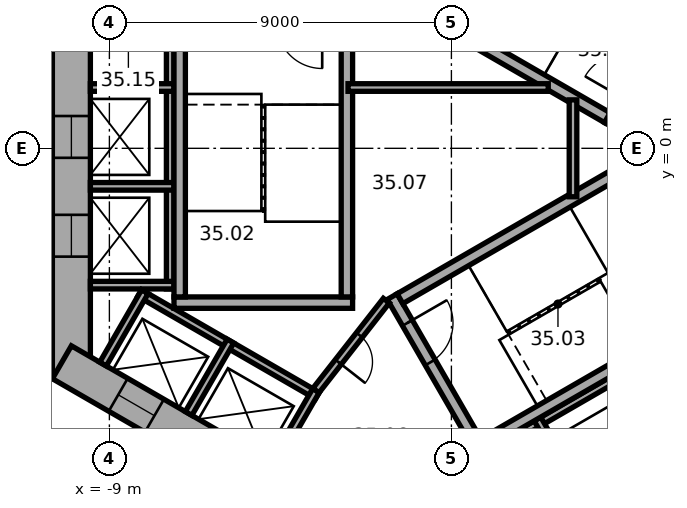
"""IFC4 building model, lengths in metres.
Left out: names, types, materials, properties, quantities, classifications, styles, units other than length and angle.
Written with IfcOpenShell. Run it as: python <this file> out.ifc"""

import sys

from ifc_helpers import new_model, si_unit, direction, frame, frame_2d, origin, place, context, subcontext, project, spatial, rectangle, extrude, element, fill, save


model = new_model("IFC4")
c1 = context("Model", 3, precision=1e-05, world=origin(), true_north=direction((0.0, 1.0)))
c2 = subcontext(c1, "Body", "Model", "MODEL_VIEW")
j1 = project(units=[si_unit("LENGTHUNIT", "METRE"), si_unit("PLANEANGLEUNIT", "RADIAN")], contexts=[c1])
p1 = place(None, origin())
s1 = spatial("IfcSite", under=j1, at=p1, CompositionType="ELEMENT")
p2 = place(p1, origin())
s2 = spatial("IfcBuilding", under=s1, at=p2, CompositionType="ELEMENT")
p3 = place(p2, frame((0.0, 0.0, 146.6)))
s3 = spatial("IfcBuildingStorey", under=s2, at=p3, CompositionType="ELEMENT", Elevation=146.6)
p4 = place(p3, frame((-10.0, 6.062, 0.0), z_axis=(0.0, 0.0, 1.0), x_axis=(0.0, -1.0, 0.0)))
e1 = element("IfcWall", 1, at=p4, inside=s3, PredefinedType="SHEAR", context=c2, shape_type="SweptSolid", body=[
    extrude(rectangle(XDim=12.125, YDim=1.0, at=frame_2d((6.062, 0.0))), origin(), (0.0, 0.0, 1.0), 3.7),
])
p5 = place(p4, frame((5.212, 0.0, 0.0)))
e2 = element("IfcOpeningElement", 2, at=p5, cuts=e1, PredefinedType="OPENING", context=c2, shape_type="SweptSolid", body=[
    extrude(rectangle(XDim=1.1, YDim=2.1, at=frame_2d((0.55, 1.05))), frame((0.0, 0.51, 0.0), z_axis=(0.0, -1.0, 0.0), x_axis=(1.0, 0.0, 0.0)), (0.0, 0.0, 1.0), 1.02),
])
p6 = place(p4, frame((7.812, 0.0, 0.0)))
e3 = element("IfcOpeningElement", 3, at=p6, cuts=e1, PredefinedType="OPENING", context=c2, shape_type="SweptSolid", body=[
    extrude(rectangle(XDim=1.1, YDim=2.1, at=frame_2d((0.55, 1.05))), frame((0.0, 0.51, 0.0), z_axis=(0.0, -1.0, 0.0), x_axis=(1.0, 0.0, 0.0)), (0.0, 0.0, 1.0), 1.02),
])
p7 = place(p3, frame((-10.25, -5.629, 0.0), z_axis=(0.0, 0.0, 1.0), x_axis=(0.866022616891, -0.50000482701, 0.0)))
e4 = element("IfcWall", 4, at=p7, inside=s3, PredefinedType="SHEAR", context=c2, shape_type="SweptSolid", body=[
    extrude(rectangle(XDim=12.125, YDim=1.0, at=frame_2d((6.062, 0.0))), origin(), (0.0, 0.0, 1.0), 3.7),
])
p8 = place(p7, frame((6.262, 0.0, 0.0)))
e5 = element("IfcOpeningElement", 5, at=p8, cuts=e4, PredefinedType="OPENING", context=c2, shape_type="SweptSolid", body=[
    extrude(rectangle(XDim=1.5, YDim=2.1, at=frame_2d((0.75, 1.05))), frame((0.0, 0.51, 0.0), z_axis=(0.0, -1.0, 0.0), x_axis=(1.0, 0.0, 0.0)), (0.0, 0.0, 1.0), 1.02),
])
p9 = place(p7, frame((1.712, 0.0, 0.0)))
e6 = element("IfcOpeningElement", 6, at=p9, cuts=e4, PredefinedType="OPENING", context=c2, shape_type="SweptSolid", body=[
    extrude(rectangle(XDim=1.1, YDim=2.1, at=frame_2d((0.55, 1.05))), frame((0.0, 0.51, 0.0), z_axis=(0.0, -1.0, 0.0), x_axis=(1.0, 0.0, 0.0)), (0.0, 0.0, 1.0), 1.02),
])
p10 = place(p7, frame((4.312, 0.0, 0.0)))
e7 = element("IfcOpeningElement", 7, at=p10, cuts=e4, PredefinedType="OPENING", context=c2, shape_type="SweptSolid", body=[
    extrude(rectangle(XDim=1.1, YDim=2.1, at=frame_2d((0.55, 1.05))), frame((0.0, 0.51, 0.0), z_axis=(0.0, -1.0, 0.0), x_axis=(1.0, 0.0, 0.0)), (0.0, 0.0, 1.0), 1.02),
])
p11 = place(p3, frame((-0.25, -11.691, 0.0), z_axis=(0.0, 0.0, 1.0), x_axis=(0.866022616891, 0.50000482701, 0.0)))
e8 = element("IfcWall", 8, at=p11, inside=s3, PredefinedType="SHEAR", context=c2, shape_type="SweptSolid", body=[
    extrude(rectangle(XDim=12.125, YDim=1.0, at=frame_2d((6.062, 0.0))), origin(), (0.0, 0.0, 1.0), 3.7),
])
p12 = place(p11, frame((2.612, 0.0, 0.0)))
e9 = element("IfcOpeningElement", 9, at=p12, cuts=e8, PredefinedType="OPENING", context=c2, shape_type="SweptSolid", body=[
    extrude(rectangle(XDim=1.1, YDim=2.1, at=frame_2d((0.55, 1.05))), frame((0.0, 0.51, 0.0), z_axis=(0.0, -1.0, 0.0), x_axis=(1.0, 0.0, 0.0)), (0.0, 0.0, 1.0), 1.02),
])
p13 = place(p11, frame((5.212, 0.0, 0.0)))
e10 = element("IfcOpeningElement", 10, at=p13, cuts=e8, PredefinedType="OPENING", context=c2, shape_type="SweptSolid", body=[
    extrude(rectangle(XDim=1.1, YDim=2.1, at=frame_2d((0.55, 1.05))), frame((0.0, 0.51, 0.0), z_axis=(0.0, -1.0, 0.0), x_axis=(1.0, 0.0, 0.0)), (0.0, 0.0, 1.0), 1.02),
])
p14 = place(p11, frame((7.812, 0.0, 0.0)))
e11 = element("IfcOpeningElement", 11, at=p14, cuts=e8, PredefinedType="OPENING", context=c2, shape_type="SweptSolid", body=[
    extrude(rectangle(XDim=1.1, YDim=2.1, at=frame_2d((0.55, 1.05))), frame((0.0, 0.51, 0.0), z_axis=(0.0, -1.0, 0.0), x_axis=(1.0, 0.0, 0.0)), (0.0, 0.0, 1.0), 1.02),
])
p15 = place(p3, frame((-7.4, 4.3, 0.0), z_axis=(0.0, 0.0, 1.0), x_axis=(0.0, -1.0, 0.0)))
e12 = element("IfcWall", 12, at=p15, inside=s3, PredefinedType="PARTITIONING", context=c2, shape_type="SweptSolid", body=[
    extrude(rectangle(XDim=8.0, YDim=0.2, at=frame_2d((4.0, 0.0))), origin(), (0.0, 0.0, 1.0), 3.42),
])
for number, where, z_axis, x_axis in (
    (13, (-7.3, 1.6, 0.0), (0.0, 0.0, 1.0), (-1.0, 0.0, 0.0)),
    (14, (-7.3, -1.0, 0.0), (0.0, 0.0, 1.0), (-1.0, 0.0, 0.0)),
    (15, (-7.3, -3.6, 0.0), (0.0, 0.0, 1.0), (-1.0, 0.0, 0.0)),
):
    element("IfcWall", number, at=place(p3, frame(where, z_axis=z_axis, x_axis=x_axis)), inside=s3, PredefinedType="PARTITIONING", context=c2, shape_type="SweptSolid", body=[
        extrude(rectangle(XDim=2.2, YDim=0.2, at=frame_2d((1.1, 0.0))), origin(), (0.0, 0.0, 1.0), 3.42),
    ])
p16 = place(p3, frame((-8.203, -3.809, 0.0), z_axis=(0.0, 0.0, 1.0), x_axis=(0.866028230842, -0.499995103361, 0.0)))
e16 = element("IfcWall", 16, at=p16, inside=s3, PredefinedType="PARTITIONING", context=c2, shape_type="SweptSolid", body=[
    extrude(rectangle(XDim=5.4, YDim=0.2, at=frame_2d((2.7, 0.0))), origin(), (0.0, 0.0, 1.0), 3.42),
])
for number, where, z_axis, x_axis in (
    (17, (-8.067, -3.772, 0.0), (0.0, 0.0, 1.0), (-0.5, -0.866, 0.0)),
    (18, (-5.815, -5.072, 0.0), (0.0, 0.0, 1.0), (-0.5, -0.866, 0.0)),
):
    element("IfcWall", number, at=place(p3, frame(where, z_axis=z_axis, x_axis=x_axis)), inside=s3, PredefinedType="PARTITIONING", context=c2, shape_type="SweptSolid", body=[
        extrude(rectangle(XDim=2.2, YDim=0.2, at=frame_2d((1.1, 0.0))), origin(), (0.0, 0.0, 1.0), 3.42),
    ])
p17 = place(p3, frame((-3.563, -6.372, 0.0), z_axis=(0.0, 0.0, 1.0), x_axis=(-0.499994660107, -0.866028486751, 0.0)))
e19 = element("IfcWall", 19, at=p17, inside=s3, PredefinedType="PARTITIONING", context=c2, shape_type="SweptSolid", body=[
    extrude(rectangle(XDim=2.2, YDim=0.2, at=frame_2d((1.1, 0.0))), origin(), (0.0, 0.0, 1.0), 3.42),
])
p18 = place(p3, frame((-0.024, -8.559, 0.0), z_axis=(0.0, 0.0, 1.0), x_axis=(0.866026010844, 0.49999894854, 0.0)))
e20 = element("IfcWall", 20, at=p18, inside=s3, PredefinedType="PARTITIONING", context=c2, shape_type="SweptSolid", body=[
    extrude(rectangle(XDim=8.0, YDim=0.2, at=frame_2d((4.0, 0.0))), origin(), (0.0, 0.0, 1.0), 3.42),
])
p19 = place(p3, frame((2.264, -7.122, 0.0), z_axis=(0.0, 0.0, 1.0), x_axis=(0.500077893725, -0.86598042715, 0.0)))
e21 = element("IfcWall", 21, at=p19, inside=s3, PredefinedType="PARTITIONING", context=c2, shape_type="SweptSolid", body=[
    extrude(rectangle(XDim=2.2, YDim=0.2, at=frame_2d((1.1, 0.0))), origin(), (0.0, 0.0, 1.0), 3.42),
])
p20 = place(p3, frame((4.158, 0.602, 0.0), z_axis=(0.0, 0.0, 1.0), x_axis=(0.499977259774, 0.866038532462, 0.0)))
e22 = element("IfcWall", 22, at=p20, inside=s3, PredefinedType="SHEAR", context=c2, shape_type="SweptSolid", body=[
    extrude(rectangle(XDim=4.7, YDim=0.3, at=frame_2d((2.35, 0.0))), origin(), (0.0, 0.0, 1.0), 3.42),
])
p21 = place(p20, frame((0.8, 0.0, 0.0)))
e23 = element("IfcOpeningElement", 23, at=p21, cuts=e22, PredefinedType="OPENING", context=c2, shape_type="SweptSolid", body=[
    extrude(rectangle(XDim=1.2, YDim=2.1, at=frame_2d((0.6, 1.05))), frame((0.0, 0.16, 0.0), z_axis=(0.0, -1.0, 0.0), x_axis=(1.0, 0.0, 0.0)), (0.0, 0.0, 1.0), 0.32),
])
p22 = place(p3, frame((4.103, 0.807, 0.0), z_axis=(0.0, 0.0, 1.0), x_axis=(-0.866027801685, 0.499995846692, 0.0)))
e24 = element("IfcWall", 24, at=p22, inside=s3, PredefinedType="SHEAR", context=c2, shape_type="SweptSolid", body=[
    extrude(rectangle(XDim=7.06, YDim=0.3, at=frame_2d((3.53, 0.0))), origin(), (0.0, 0.0, 1.0), 3.42),
])
p23 = place(p3, frame((-2.6, -4.06, 0.0), z_axis=(0.0, 0.0, 1.0), x_axis=(-1.0, 0.0, 0.0)))
e25 = element("IfcWall", 25, at=p23, inside=s3, PredefinedType="SHEAR", context=c2, shape_type="SweptSolid", body=[
    extrude(rectangle(XDim=4.7, YDim=0.3, at=frame_2d((2.35, 0.0))), origin(), (0.0, 0.0, 1.0), 3.42),
])
for number, where, z_axis, x_axis in (
    (26, (-2.75, 3.15, 0.0), (0.0, 0.0, 1.0), (0.0, -1.0, 0.0)),
    (27, (-7.15, 3.15, 0.0), (0.0, 0.0, 1.0), (0.0, -1.0, 0.0)),
):
    element("IfcWall", number, at=place(p3, frame(where, z_axis=z_axis, x_axis=x_axis)), inside=s3, PredefinedType="SHEAR", context=c2, shape_type="SweptSolid", body=[
        extrude(rectangle(XDim=7.06, YDim=0.3, at=frame_2d((3.53, 0.0))), origin(), (0.0, 0.0, 1.0), 3.42),
    ])
p24 = place(p3, frame((-1.558, -3.902, 0.0), z_axis=(0.0, 0.0, 1.0), x_axis=(0.499977259774, -0.866038532462, 0.0)))
e28 = element("IfcWall", 28, at=p24, inside=s3, PredefinedType="SHEAR", context=c2, shape_type="SweptSolid", body=[
    extrude(rectangle(XDim=4.7, YDim=0.3, at=frame_2d((2.35, 0.0))), origin(), (0.0, 0.0, 1.0), 3.42),
])
p25 = place(p24, frame((0.8, 0.0, 0.0)))
e29 = element("IfcOpeningElement", 29, at=p25, cuts=e28, PredefinedType="OPENING", context=c2, shape_type="SweptSolid", body=[
    extrude(rectangle(XDim=1.2, YDim=2.1, at=frame_2d((0.6, 1.05))), frame((0.0, 0.16, 0.0), z_axis=(0.0, -1.0, 0.0), x_axis=(1.0, 0.0, 0.0)), (0.0, 0.0, 1.0), 0.32),
])
for number, where, z_axis, x_axis in (
    (30, (-1.353, -3.957, 0.0), (0.0, 0.0, 1.0), (0.866, 0.5, 0.0)),
    (31, (0.847, -7.767, 0.0), (0.0, 0.0, 1.0), (0.866, 0.5, 0.0)),
):
    element("IfcWall", number, at=place(p3, frame(where, z_axis=z_axis, x_axis=x_axis)), inside=s3, PredefinedType="SHEAR", context=c2, shape_type="SweptSolid", body=[
        extrude(rectangle(XDim=7.06, YDim=0.3, at=frame_2d((3.53, 0.0))), origin(), (0.0, 0.0, 1.0), 3.42),
    ])
p26 = place(p3, frame((-1.712, -4.008, 0.0), z_axis=(0.0, 0.0, 1.0), x_axis=(-0.616549420702, -0.787316208287, 0.0)))
e32 = element("IfcWall", 32, at=p26, inside=s3, PredefinedType="PARTITIONING", context=c2, shape_type="SweptSolid", body=[
    extrude(rectangle(XDim=3.002, YDim=0.2, at=frame_2d((1.501, 0.0))), origin(), (0.0, 0.0, 1.0), 3.42),
])
p27 = place(p26, frame((1.15, 0.0, 0.0)))
e33 = element("IfcOpeningElement", 33, at=p27, cuts=e32, PredefinedType="OPENING", context=c2, shape_type="SweptSolid", body=[
    extrude(rectangle(XDim=0.9, YDim=2.1, at=frame_2d((0.45, 1.05))), frame((0.0, 0.11, 0.0), z_axis=(0.0, -1.0, 0.0), x_axis=(1.0, 0.0, 0.0)), (0.0, 0.0, 1.0), 0.22),
])
p28 = place(p3, frame((-2.72, 1.6, 0.0), z_axis=(0.0, 0.0, 1.0), x_axis=(1.0, 0.0, 0.0)))
e34 = element("IfcWall", 34, at=p28, inside=s3, PredefinedType="PARTITIONING", context=c2, shape_type="SweptSolid", body=[
    extrude(rectangle(XDim=5.269, YDim=0.2, at=frame_2d((2.634, 0.0))), origin(), (0.0, 0.0, 1.0), 3.42),
])
p29 = place(p3, frame((3.2, -1.275, 0.0), z_axis=(0.0, 0.0, 1.0), x_axis=(0.0, 1.0, 0.0)))
e35 = element("IfcWall", 35, at=p29, inside=s3, PredefinedType="PARTITIONING", context=c2, shape_type="SweptSolid", body=[
    extrude(rectangle(XDim=2.549, YDim=0.2, at=frame_2d((1.275, 0.0))), origin(), (0.0, 0.0, 1.0), 3.42),
])
p30 = place(p25, origin())
e36 = element("IfcDoor", 36, at=p30, inside=s3, OperationType="SINGLE_SWING_RIGHT", PredefinedType="DOOR", context=c2, shape_type="SweptSolid", body=[
    extrude(rectangle(XDim=1.2, YDim=2.1, at=frame_2d((0.6, 1.05))), frame((0.0, 0.025, 0.0), z_axis=(0.0, -1.0, 0.0), x_axis=(1.0, 0.0, 0.0)), (0.0, 0.0, 1.0), 0.05),
])
fill(e29, e36)
p31 = place(p27, origin())
e37 = element("IfcDoor", 37, at=p31, inside=s3, OperationType="SINGLE_SWING_LEFT", PredefinedType="DOOR", context=c2, shape_type="SweptSolid", body=[
    extrude(rectangle(XDim=0.9, YDim=2.1, at=frame_2d((0.45, 1.05))), frame((0.0, 0.025, 0.0), z_axis=(0.0, -1.0, 0.0), x_axis=(1.0, 0.0, 0.0)), (0.0, 0.0, 1.0), 0.05),
])
fill(e33, e37)
p32 = place(p5, origin())
e38 = element("IfcDoor", 38, at=p32, inside=s3, OperationType="DOUBLE_DOOR_SLIDING", PredefinedType="DOOR", context=c2, shape_type="SweptSolid", body=[
    extrude(rectangle(XDim=1.1, YDim=2.1, at=frame_2d((0.55, 1.05))), frame((0.0, 0.025, 0.0), z_axis=(0.0, -1.0, 0.0), x_axis=(1.0, 0.0, 0.0)), (0.0, 0.0, 1.0), 0.05),
])
fill(e2, e38)
p33 = place(p6, origin())
e39 = element("IfcDoor", 39, at=p33, inside=s3, OperationType="DOUBLE_DOOR_SLIDING", PredefinedType="DOOR", context=c2, shape_type="SweptSolid", body=[
    extrude(rectangle(XDim=1.1, YDim=2.1, at=frame_2d((0.55, 1.05))), frame((0.0, 0.025, 0.0), z_axis=(0.0, -1.0, 0.0), x_axis=(1.0, 0.0, 0.0)), (0.0, 0.0, 1.0), 0.05),
])
fill(e3, e39)
p34 = place(p9, origin())
e40 = element("IfcDoor", 40, at=p34, inside=s3, OperationType="DOUBLE_DOOR_SLIDING", PredefinedType="DOOR", context=c2, shape_type="SweptSolid", body=[
    extrude(rectangle(XDim=1.1, YDim=2.1, at=frame_2d((0.55, 1.05))), frame((0.0, 0.025, 0.0), z_axis=(0.0, -1.0, 0.0), x_axis=(1.0, 0.0, 0.0)), (0.0, 0.0, 1.0), 0.05),
])
fill(e6, e40)
save(model, sys.argv[1])
